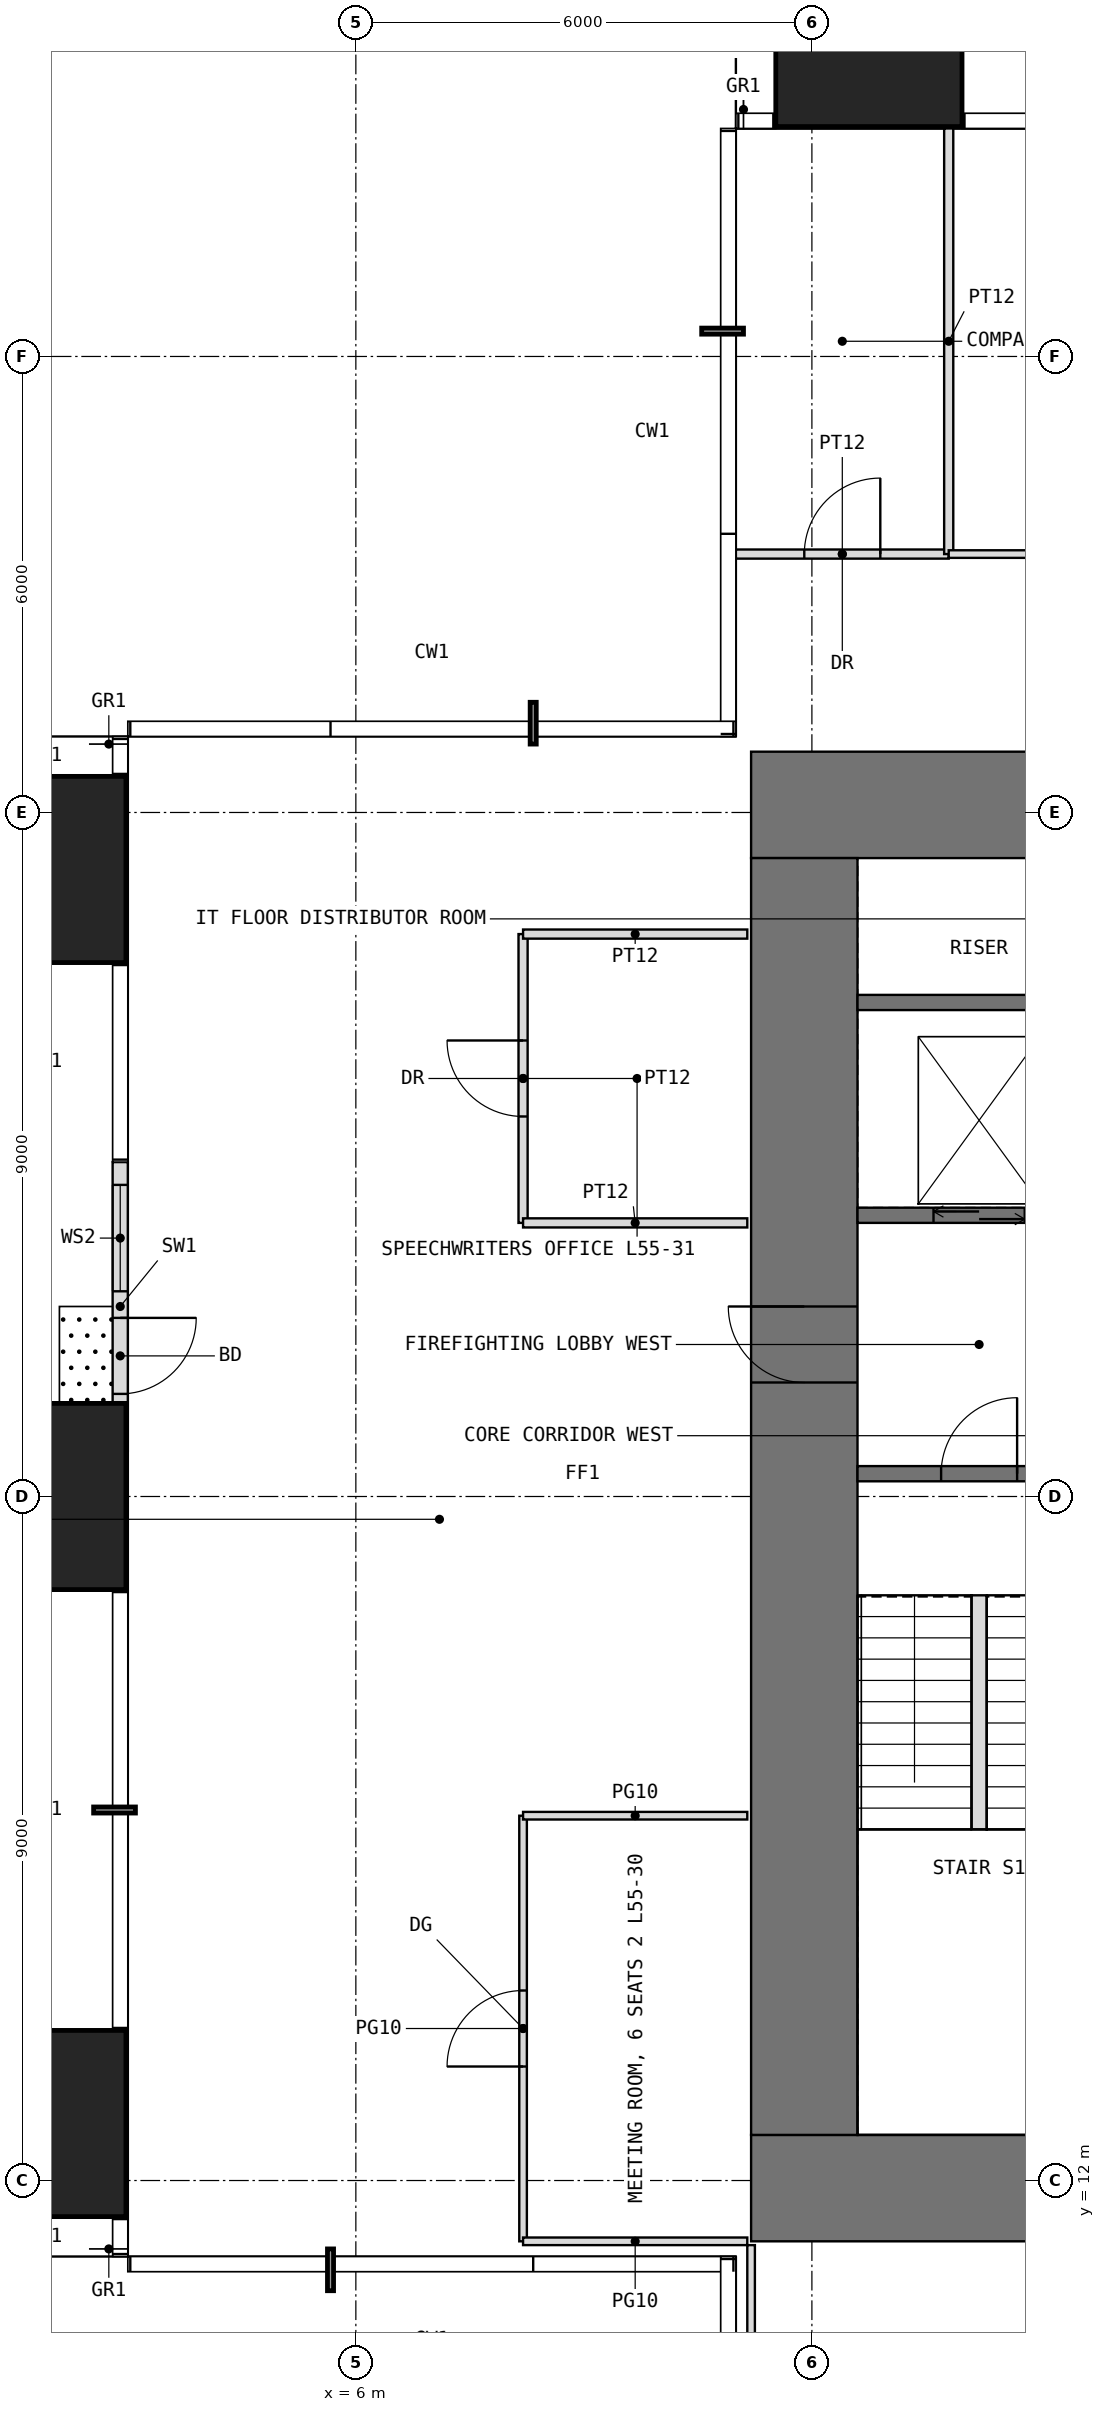
"""IFC4 building model, lengths in metres.
Left out: names, types, materials, properties, quantities, classifications, styles, units other than length and angle.
Written with IfcOpenShell. Run it as: python <this file> out.ifc"""

import sys

from ifc_helpers import new_model, si_unit, direction, frame, frame_2d, origin, origin_2d, place, context, subcontext, project, spatial, rectangle, extrude, element, fill, save


model = new_model("IFC4")
c1 = context("Model", 3, precision=1e-05, world=origin(), true_north=direction((0.0, 1.0)))
c2 = subcontext(c1, "Body", "Model", "MODEL_VIEW")
j1 = project(units=[si_unit("LENGTHUNIT", "METRE"), si_unit("PLANEANGLEUNIT", "RADIAN")], contexts=[c1])
p1 = place(None, origin())
s1 = spatial("IfcSite", under=j1, at=p1, CompositionType="ELEMENT")
p2 = place(p1, origin())
s2 = spatial("IfcBuilding", under=s1, at=p2, CompositionType="ELEMENT")
p3 = place(p2, frame((0.0, 0.0, 230.5)))
s3 = spatial("IfcBuildingStorey", under=s2, at=p3, CompositionType="ELEMENT", Elevation=230.5)
for number, where, z_axis, x_axis in (
    (1, (1.75, 12.75, 0.0), (0.0, 0.0, 1.0), (1.0, 0.0, 0.0)),
    (2, (1.75, 21.0, 0.0), (0.0, 0.0, 1.0), (1.0, 0.0, 0.0)),
    (3, (1.75, 29.25, 0.0), (0.0, 0.0, 1.0), (1.0, 0.0, 0.0)),
    (4, (12.75, 40.25, 0.0), (0.0, 0.0, 1.0), (1.0, 0.0, 0.0)),
):
    element("IfcColumn", number, at=place(p3, frame(where, z_axis=z_axis, x_axis=x_axis)), inside=s3, PredefinedType="COLUMN", context=c2, shape_type="SweptSolid", body=[
        extrude(rectangle(XDim=2.45, YDim=2.45, at=origin_2d()), origin(), (0.0, 0.0, 1.0), 4.0),
    ])
p4 = place(p3, frame((2.9, 25.4, 0.0), z_axis=(0.0, 0.0, 1.0), x_axis=(0.0, -1.0, 0.0)))
e5 = element("IfcWall", 5, at=p4, inside=s3, PredefinedType="USERDEFINED", context=c2, shape_type="SweptSolid", body=[
    extrude(rectangle(XDim=3.8, YDim=0.2, at=frame_2d((1.9, 0.0))), origin(), (0.0, 0.0, 1.0), 3.55),
])
p5 = place(p4, frame((2.05, 0.0, 0.0)))
e6 = element("IfcOpeningElement", 6, at=p5, cuts=e5, PredefinedType="OPENING", context=c2, shape_type="SweptSolid", body=[
    extrude(rectangle(XDim=1.0, YDim=2.4, at=frame_2d((0.5, 1.2))), frame((0.0, 0.11, 0.0), z_axis=(0.0, -1.0, 0.0), x_axis=(1.0, 0.0, 0.0)), (0.0, 0.0, 1.0), 0.22),
])
p6 = place(p4, frame((0.3, 0.0, 0.3)))
e7 = element("IfcOpeningElement", 7, at=p6, cuts=e5, PredefinedType="OPENING", context=c2, shape_type="SweptSolid", body=[
    extrude(rectangle(XDim=1.4, YDim=2.7, at=frame_2d((0.7, 1.35))), frame((0.0, 0.11, 0.0), z_axis=(0.0, -1.0, 0.0), x_axis=(1.0, 0.0, 0.0)), (0.0, 0.0, 1.0), 0.22),
])
p7 = place(p3, frame((11.2, 11.9, -0.05), z_axis=(0.0, 0.0, 1.0), x_axis=(1.0, 0.0, 0.0)))
e8 = element("IfcWall", 8, at=p7, inside=s3, PredefinedType="SHEAR", context=c2, shape_type="SweptSolid", body=[
    extrude(rectangle(XDim=19.6, YDim=1.4, at=frame_2d((9.8, 0.0))), origin(), (0.0, 0.0, 1.0), 3.8),
])
p8 = place(p7, frame((8.8, 0.0, 0.05)))
e9 = element("IfcOpeningElement", 9, at=p8, cuts=e8, PredefinedType="OPENING", context=c2, shape_type="SweptSolid", body=[
    extrude(rectangle(XDim=2.0, YDim=2.2, at=frame_2d((1.0, 1.1))), frame((0.0, 0.71, 0.0), z_axis=(0.0, -1.0, 0.0), x_axis=(1.0, 0.0, 0.0)), (0.0, 0.0, 1.0), 1.42),
])
p9 = place(p3, frame((11.2, 30.1, -0.05), z_axis=(0.0, 0.0, 1.0), x_axis=(1.0, 0.0, 0.0)))
e10 = element("IfcWall", 10, at=p9, inside=s3, PredefinedType="SHEAR", context=c2, shape_type="SweptSolid", body=[
    extrude(rectangle(XDim=19.6, YDim=1.4, at=frame_2d((9.8, 0.0))), origin(), (0.0, 0.0, 1.0), 3.8),
])
p10 = place(p9, frame((8.8, 0.0, 0.05)))
e11 = element("IfcOpeningElement", 11, at=p10, cuts=e10, PredefinedType="OPENING", context=c2, shape_type="SweptSolid", body=[
    extrude(rectangle(XDim=2.0, YDim=2.2, at=frame_2d((1.0, 1.1))), frame((0.0, 0.71, 0.0), z_axis=(0.0, -1.0, 0.0), x_axis=(1.0, 0.0, 0.0)), (0.0, 0.0, 1.0), 1.42),
])
p11 = place(p3, frame((11.9, 12.6, -0.05), z_axis=(0.0, 0.0, 1.0), x_axis=(0.0, 1.0, 0.0)))
e12 = element("IfcWall", 12, at=p11, inside=s3, PredefinedType="SHEAR", context=c2, shape_type="SweptSolid", body=[
    extrude(rectangle(XDim=16.8, YDim=1.4, at=frame_2d((8.4, 0.0))), origin(), (0.0, 0.0, 1.0), 3.8),
])
p12 = place(p11, frame((9.9, 0.0, 0.05)))
e13 = element("IfcOpeningElement", 13, at=p12, cuts=e12, PredefinedType="OPENING", context=c2, shape_type="SweptSolid", body=[
    extrude(rectangle(XDim=1.0, YDim=2.2, at=frame_2d((0.5, 1.1))), frame((0.0, 0.71, 0.0), z_axis=(0.0, -1.0, 0.0), x_axis=(1.0, 0.0, 0.0)), (0.0, 0.0, 1.0), 1.42),
])
p13 = place(p3, frame((12.6, 21.3, -0.05), z_axis=(0.0, 0.0, 1.0), x_axis=(1.0, 0.0, 0.0)))
e14 = element("IfcWall", 14, at=p13, inside=s3, PredefinedType="SHEAR", context=c2, shape_type="SweptSolid", body=[
    extrude(rectangle(XDim=3.2, YDim=0.2, at=frame_2d((1.6, 0.0))), origin(), (0.0, 0.0, 1.0), 3.8),
])
p14 = place(p13, frame((1.1, 0.0, 0.05)))
e15 = element("IfcOpeningElement", 15, at=p14, cuts=e14, PredefinedType="OPENING", context=c2, shape_type="SweptSolid", body=[
    extrude(rectangle(XDim=1.0, YDim=2.2, at=frame_2d((0.5, 1.1))), frame((0.0, 0.11, 0.0), z_axis=(0.0, -1.0, 0.0), x_axis=(1.0, 0.0, 0.0)), (0.0, 0.0, 1.0), 0.22),
])
p15 = place(p3, frame((12.6, 24.7, -0.05), z_axis=(0.0, 0.0, 1.0), x_axis=(1.0, 0.0, 0.0)))
e16 = element("IfcWall", 16, at=p15, inside=s3, PredefinedType="SHEAR", context=c2, shape_type="SweptSolid", body=[
    extrude(rectangle(XDim=3.2, YDim=0.2, at=frame_2d((1.6, 0.0))), origin(), (0.0, 0.0, 1.0), 3.8),
])
p16 = place(p15, frame((1.0, 0.0, 0.05)))
e17 = element("IfcOpeningElement", 17, at=p16, cuts=e16, PredefinedType="OPENING", context=c2, shape_type="SweptSolid", body=[
    extrude(rectangle(XDim=1.2, YDim=2.2, at=frame_2d((0.6, 1.1))), frame((0.0, 0.11, 0.0), z_axis=(0.0, -1.0, 0.0), x_axis=(1.0, 0.0, 0.0)), (0.0, 0.0, 1.0), 0.22),
])
p17 = place(p3, frame((12.6, 27.5, -0.05), z_axis=(0.0, 0.0, 1.0), x_axis=(1.0, 0.0, 0.0)))
e18 = element("IfcWall", 18, at=p17, inside=s3, PredefinedType="SHEAR", context=c2, shape_type="SweptSolid", body=[
    extrude(rectangle(XDim=3.2, YDim=0.2, at=frame_2d((1.6, 0.0))), origin(), (0.0, 0.0, 1.0), 3.8),
])
p18 = place(p3, frame((8.2, 11.2, 0.0), z_axis=(0.0, 0.0, 1.0), x_axis=(0.0, 1.0, 0.0)))
e19 = element("IfcWall", 19, at=p18, inside=s3, PredefinedType="PARTITIONING", context=c2, shape_type="SweptSolid", body=[
    extrude(rectangle(XDim=5.6, YDim=0.1, at=frame_2d((2.8, 0.0))), origin(), (0.0, 0.0, 1.0), 3.55),
])
p19 = place(p18, frame((2.3, 0.0, 0.0)))
e20 = element("IfcOpeningElement", 20, at=p19, cuts=e19, PredefinedType="OPENING", context=c2, shape_type="SweptSolid", body=[
    extrude(rectangle(XDim=1.0, YDim=2.4, at=frame_2d((0.5, 1.2))), frame((0.0, 0.06, 0.0), z_axis=(0.0, -1.0, 0.0), x_axis=(1.0, 0.0, 0.0)), (0.0, 0.0, 1.0), 0.12),
])
for number, where, z_axis, x_axis in (
    (21, (8.2, 11.2, 0.0), (0.0, 0.0, 1.0), (1.0, 0.0, 0.0)),
    (22, (8.2, 16.8, 0.0), (0.0, 0.0, 1.0), (1.0, 0.0, 0.0)),
):
    element("IfcWall", number, at=place(p3, frame(where, z_axis=z_axis, x_axis=x_axis)), inside=s3, PredefinedType="PARTITIONING", context=c2, shape_type="SweptSolid", body=[
        extrude(rectangle(XDim=2.95, YDim=0.1, at=frame_2d((1.475, 0.0))), origin(), (0.0, 0.0, 1.0), 3.55),
    ])
p20 = place(p3, frame((8.2, 24.6, 0.0), z_axis=(0.0, 0.0, 1.0), x_axis=(0.0, 1.0, 0.0)))
e23 = element("IfcWall", 23, at=p20, inside=s3, PredefinedType="PARTITIONING", context=c2, shape_type="SweptSolid", body=[
    extrude(rectangle(XDim=3.8, YDim=0.12, at=frame_2d((1.9, 0.0))), origin(), (0.0, 0.0, 1.0), 3.55),
])
p21 = place(p20, frame((1.4, 0.0, 0.0)))
e24 = element("IfcOpeningElement", 24, at=p21, cuts=e23, PredefinedType="OPENING", context=c2, shape_type="SweptSolid", body=[
    extrude(rectangle(XDim=1.0, YDim=2.2, at=frame_2d((0.5, 1.1))), frame((0.0, 0.07, 0.0), z_axis=(0.0, -1.0, 0.0), x_axis=(1.0, 0.0, 0.0)), (0.0, 0.0, 1.0), 0.14),
])
for number, where, z_axis, x_axis in (
    (25, (8.2, 24.6, 0.0), (0.0, 0.0, 1.0), (1.0, 0.0, 0.0)),
    (26, (8.2, 28.4, 0.0), (0.0, 0.0, 1.0), (1.0, 0.0, 0.0)),
):
    element("IfcWall", number, at=place(p3, frame(where, z_axis=z_axis, x_axis=x_axis)), inside=s3, PredefinedType="PARTITIONING", context=c2, shape_type="SweptSolid", body=[
        extrude(rectangle(XDim=2.95, YDim=0.12, at=frame_2d((1.475, 0.0))), origin(), (0.0, 0.0, 1.0), 3.55),
    ])
p22 = place(p3, frame((11.0, 33.4, 0.0), z_axis=(0.0, 0.0, 1.0), x_axis=(1.0, 0.0, 0.0)))
e27 = element("IfcWall", 27, at=p22, inside=s3, PredefinedType="PARTITIONING", context=c2, shape_type="SweptSolid", body=[
    extrude(rectangle(XDim=2.8, YDim=0.12, at=frame_2d((1.4, 0.0))), origin(), (0.0, 0.0, 1.0), 3.55),
])
p23 = place(p22, frame((0.9, 0.0, 0.0)))
e28 = element("IfcOpeningElement", 28, at=p23, cuts=e27, PredefinedType="OPENING", context=c2, shape_type="SweptSolid", body=[
    extrude(rectangle(XDim=1.0, YDim=2.2, at=frame_2d((0.5, 1.1))), frame((0.0, 0.07, 0.0), z_axis=(0.0, -1.0, 0.0), x_axis=(1.0, 0.0, 0.0)), (0.0, 0.0, 1.0), 0.14),
])
p24 = place(p3, frame((11.2, 6.6, 0.0), z_axis=(0.0, 0.0, 1.0), x_axis=(0.0, 1.0, 0.0)))
e29 = element("IfcWall", 29, at=p24, inside=s3, PredefinedType="PARTITIONING", context=c2, shape_type="SweptSolid", body=[
    extrude(rectangle(XDim=4.55, YDim=0.1, at=frame_2d((2.275, 0.0))), origin(), (0.0, 0.0, 1.0), 3.55),
])
p25 = place(p3, frame((13.8, 33.4, 0.0), z_axis=(0.0, 0.0, 1.0), x_axis=(0.0, 1.0, 0.0)))
e30 = element("IfcWall", 30, at=p25, inside=s3, PredefinedType="PARTITIONING", context=c2, shape_type="SweptSolid", body=[
    extrude(rectangle(XDim=5.6, YDim=0.12, at=frame_2d((2.8, 0.0))), origin(), (0.0, 0.0, 1.0), 3.55),
])
p26 = place(p3, frame((13.8, 33.4, 0.0), z_axis=(0.0, 0.0, 1.0), x_axis=(1.0, 0.0, 0.0)))
e31 = element("IfcWall", 31, at=p26, inside=s3, PredefinedType="PARTITIONING", context=c2, shape_type="SweptSolid", body=[
    extrude(rectangle(XDim=9.25, YDim=0.1, at=frame_2d((4.625, 0.0))), origin(), (0.0, 0.0, 1.0), 3.55),
])
p27 = place(p26, frame((4.125, 0.0, 0.0)))
e32 = element("IfcOpeningElement", 32, at=p27, cuts=e31, PredefinedType="OPENING", context=c2, shape_type="SweptSolid", body=[
    extrude(rectangle(XDim=1.0, YDim=2.4, at=frame_2d((0.5, 1.2))), frame((0.0, 0.06, 0.0), z_axis=(0.0, -1.0, 0.0), x_axis=(1.0, 0.0, 0.0)), (0.0, 0.0, 1.0), 0.12),
])
p28 = place(p3, frame((14.2, 16.62, 0.0), z_axis=(0.0, 0.0, 1.0), x_axis=(0.0, 1.0, 0.0)))
e33 = element("IfcWall", 33, at=p28, inside=s3, PredefinedType="PARTITIONING", context=c2, shape_type="SweptSolid", body=[
    extrude(rectangle(XDim=3.08, YDim=0.2, at=frame_2d((1.54, 0.0))), origin(), (0.0, 0.0, 1.0), 4.0),
])
p29 = place(p5, origin())
e34 = element("IfcDoor", 34, at=p29, inside=s3, OperationType="SINGLE_SWING_LEFT", PredefinedType="DOOR", context=c2, shape_type="SweptSolid", body=[
    extrude(rectangle(XDim=1.0, YDim=2.4, at=frame_2d((0.5, 1.2))), frame((0.0, 0.025, 0.0), z_axis=(0.0, -1.0, 0.0), x_axis=(1.0, 0.0, 0.0)), (0.0, 0.0, 1.0), 0.05),
])
fill(e6, e34)
p30 = place(p6, origin())
e35 = element("IfcWindow", 35, at=p30, inside=s3, PartitioningType="SINGLE_PANEL", PredefinedType="WINDOW", context=c2, shape_type="SweptSolid", body=[
    extrude(rectangle(XDim=1.4, YDim=2.7, at=frame_2d((0.7, 1.35))), frame((0.0, 0.03, 0.0), z_axis=(0.0, -1.0, 0.0), x_axis=(1.0, 0.0, 0.0)), (0.0, 0.0, 1.0), 0.06),
])
fill(e7, e35)
p31 = place(p12, origin())
e36 = element("IfcDoor", 36, at=p31, inside=s3, OperationType="SINGLE_SWING_RIGHT", PredefinedType="DOOR", context=c2, shape_type="SweptSolid", body=[
    extrude(rectangle(XDim=1.0, YDim=2.2, at=frame_2d((0.5, 1.1))), frame((0.0, 0.025, 0.0), z_axis=(0.0, -1.0, 0.0), x_axis=(1.0, 0.0, 0.0)), (0.0, 0.0, 1.0), 0.05),
])
fill(e13, e36)
p32 = place(p14, origin())
e37 = element("IfcDoor", 37, at=p32, inside=s3, OperationType="SINGLE_SWING_RIGHT", PredefinedType="DOOR", context=c2, shape_type="SweptSolid", body=[
    extrude(rectangle(XDim=1.0, YDim=2.2, at=frame_2d((0.5, 1.1))), frame((0.0, 0.025, 0.0), z_axis=(0.0, -1.0, 0.0), x_axis=(1.0, 0.0, 0.0)), (0.0, 0.0, 1.0), 0.05),
])
fill(e15, e37)
p33 = place(p23, origin())
e38 = element("IfcDoor", 38, at=p33, inside=s3, OperationType="SINGLE_SWING_RIGHT", PredefinedType="DOOR", context=c2, shape_type="SweptSolid", body=[
    extrude(rectangle(XDim=1.0, YDim=2.2, at=frame_2d((0.5, 1.1))), frame((0.0, 0.025, 0.0), z_axis=(0.0, -1.0, 0.0), x_axis=(1.0, 0.0, 0.0)), (0.0, 0.0, 1.0), 0.05),
])
fill(e28, e38)
p34 = place(p19, origin())
e39 = element("IfcDoor", 39, at=p34, inside=s3, OperationType="SINGLE_SWING_LEFT", PredefinedType="DOOR", context=c2, shape_type="SweptSolid", body=[
    extrude(rectangle(XDim=1.0, YDim=2.4, at=frame_2d((0.5, 1.2))), frame((0.0, 0.025, 0.0), z_axis=(0.0, -1.0, 0.0), x_axis=(1.0, 0.0, 0.0)), (0.0, 0.0, 1.0), 0.05),
])
fill(e20, e39)
p35 = place(p21, origin())
e40 = element("IfcDoor", 40, at=p35, inside=s3, OperationType="SINGLE_SWING_RIGHT", PredefinedType="DOOR", context=c2, shape_type="SweptSolid", body=[
    extrude(rectangle(XDim=1.0, YDim=2.2, at=frame_2d((0.5, 1.1))), frame((0.0, 0.025, 0.0), z_axis=(0.0, -1.0, 0.0), x_axis=(1.0, 0.0, 0.0)), (0.0, 0.0, 1.0), 0.05),
])
fill(e24, e40)
p36 = place(p16, origin())
e41 = element("IfcDoor", 41, at=p36, inside=s3, OperationType="DOUBLE_DOOR_SLIDING", PredefinedType="DOOR", context=c2, shape_type="SweptSolid", body=[
    extrude(rectangle(XDim=1.2, YDim=2.2, at=frame_2d((0.6, 1.1))), frame((0.0, 0.025, 0.0), z_axis=(0.0, -1.0, 0.0), x_axis=(1.0, 0.0, 0.0)), (0.0, 0.0, 1.0), 0.05),
])
fill(e17, e41)
save(model, sys.argv[1])
